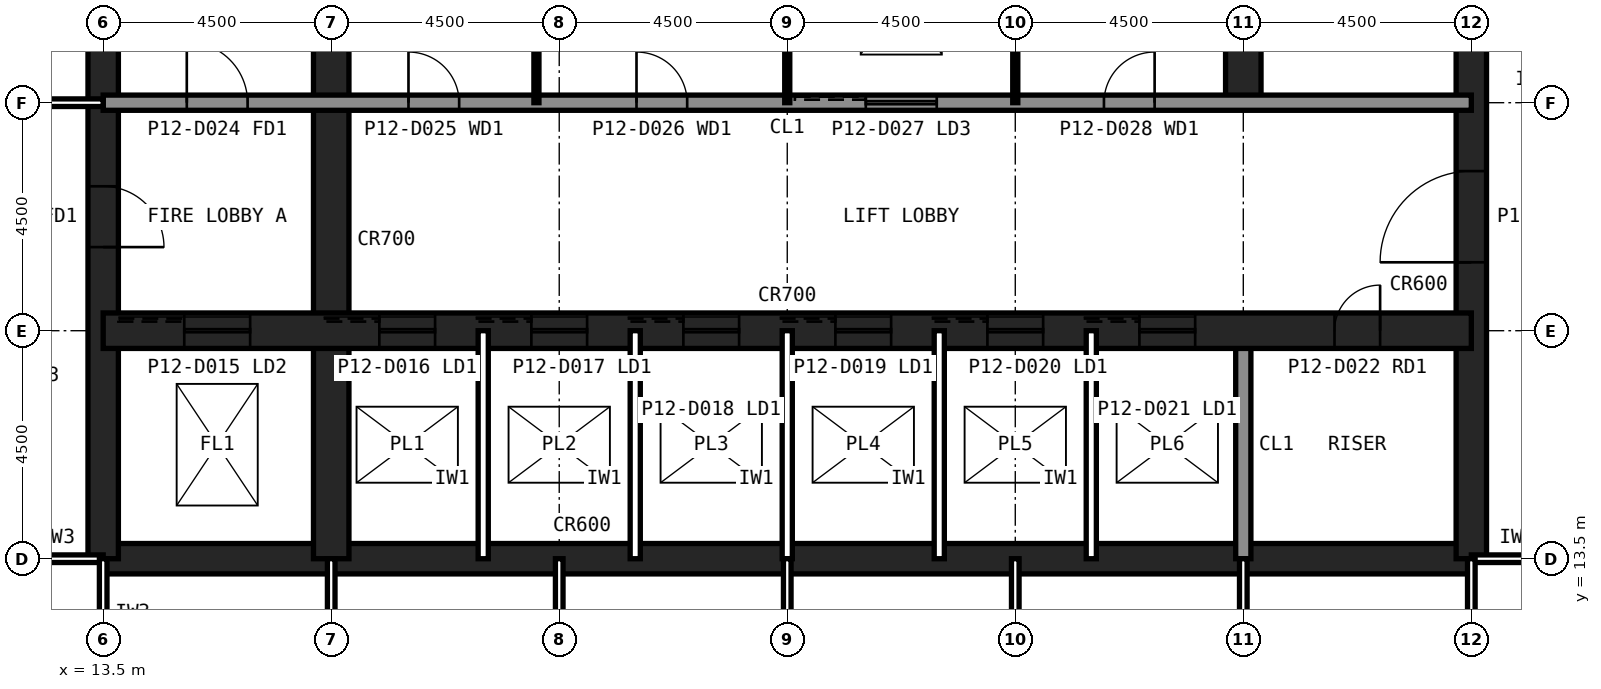
"""IFC4 building model, lengths in metres.
Left out: names, types, materials, properties, quantities, classifications, styles, units other than length and angle.
Written with IfcOpenShell. Run it as: python <this file> out.ifc"""

import sys

from ifc_helpers import new_model, si_unit, direction, frame, frame_2d, origin, place, context, subcontext, project, spatial, rectangle, extrude, element, fill, save


model = new_model("IFC4")
c1 = context("Model", 3, precision=1e-05, world=origin(), true_north=direction((0.0, 1.0)))
c2 = subcontext(c1, "Body", "Model", "MODEL_VIEW")
j1 = project(units=[si_unit("LENGTHUNIT", "METRE"), si_unit("PLANEANGLEUNIT", "RADIAN")], contexts=[c1])
p1 = place(None, origin())
s1 = spatial("IfcSite", under=j1, at=p1, CompositionType="ELEMENT")
p2 = place(p1, origin())
s2 = spatial("IfcBuilding", under=s1, at=p2, CompositionType="ELEMENT")
p3 = place(p2, frame((0.0, 0.0, 54.2)))
s3 = spatial("IfcBuildingStorey", under=s2, at=p3, CompositionType="ELEMENT", Elevation=54.2)
p4 = place(p3, frame((13.5, 13.5, 0.0), z_axis=(0.0, 0.0, 1.0), x_axis=(1.0, 0.0, 0.0)))
e1 = element("IfcWall", 1, at=p4, inside=s3, PredefinedType="SHEAR", context=c2, shape_type="SweptSolid", body=[
    extrude(rectangle(XDim=27.0, YDim=0.6, at=frame_2d((13.5, 0.0))), origin(), (0.0, 0.0, 1.0), 4.2),
])
p5 = place(p3, frame((40.5, 13.5, 0.0), z_axis=(0.0, 0.0, 1.0), x_axis=(0.0, 1.0, 0.0)))
e2 = element("IfcWall", 2, at=p5, inside=s3, PredefinedType="SHEAR", context=c2, shape_type="SweptSolid", body=[
    extrude(rectangle(XDim=27.0, YDim=0.6, at=frame_2d((13.5, 0.0))), origin(), (0.0, 0.0, 1.0), 4.2),
])
p6 = place(p5, frame((5.85, 0.0, 0.0)))
e3 = element("IfcOpeningElement", 3, at=p6, cuts=e2, PredefinedType="OPENING", context=c2, shape_type="SweptSolid", body=[
    extrude(rectangle(XDim=1.8, YDim=2.1, at=frame_2d((0.9, 1.05))), frame((0.0, 0.31, 0.0), z_axis=(0.0, -1.0, 0.0), x_axis=(1.0, 0.0, 0.0)), (0.0, 0.0, 1.0), 0.62),
])
p7 = place(p5, frame((19.65, 0.0, 0.0)))
e4 = element("IfcOpeningElement", 4, at=p7, cuts=e2, PredefinedType="OPENING", context=c2, shape_type="SweptSolid", body=[
    extrude(rectangle(XDim=1.2, YDim=2.1, at=frame_2d((0.6, 1.05))), frame((0.0, 0.31, 0.0), z_axis=(0.0, -1.0, 0.0), x_axis=(1.0, 0.0, 0.0)), (0.0, 0.0, 1.0), 0.62),
])
p8 = place(p3, frame((13.5, 40.5, 0.0), z_axis=(0.0, 0.0, 1.0), x_axis=(0.0, -1.0, 0.0)))
e5 = element("IfcWall", 5, at=p8, inside=s3, PredefinedType="SHEAR", context=c2, shape_type="SweptSolid", body=[
    extrude(rectangle(XDim=27.0, YDim=0.6, at=frame_2d((13.5, 0.0))), origin(), (0.0, 0.0, 1.0), 4.2),
])
p9 = place(p8, frame((19.65, 0.0, 0.0)))
e6 = element("IfcOpeningElement", 6, at=p9, cuts=e5, PredefinedType="OPENING", context=c2, shape_type="SweptSolid", body=[
    extrude(rectangle(XDim=1.2, YDim=2.1, at=frame_2d((0.6, 1.05))), frame((0.0, 0.31, 0.0), z_axis=(0.0, -1.0, 0.0), x_axis=(1.0, 0.0, 0.0)), (0.0, 0.0, 1.0), 0.62),
])
p10 = place(p8, frame((5.85, 0.0, 0.0)))
e7 = element("IfcOpeningElement", 7, at=p10, cuts=e5, PredefinedType="OPENING", context=c2, shape_type="SweptSolid", body=[
    extrude(rectangle(XDim=1.8, YDim=2.1, at=frame_2d((0.9, 1.05))), frame((0.0, 0.31, 0.0), z_axis=(0.0, -1.0, 0.0), x_axis=(1.0, 0.0, 0.0)), (0.0, 0.0, 1.0), 0.62),
])
p11 = place(p3, frame((18.0, 13.5, 0.0), z_axis=(0.0, 0.0, 1.0), x_axis=(0.0, 1.0, 0.0)))
e8 = element("IfcWall", 8, at=p11, inside=s3, PredefinedType="SHEAR", context=c2, shape_type="SweptSolid", body=[
    extrude(rectangle(XDim=18.0, YDim=0.7, at=frame_2d((9.0, 0.0))), origin(), (0.0, 0.0, 1.0), 4.2),
])
p12 = place(p3, frame((36.0, 13.5, 0.0), z_axis=(0.0, 0.0, 1.0), x_axis=(0.0, 1.0, 0.0)))
e9 = element("IfcWall", 9, at=p12, inside=s3, PredefinedType="SOLIDWALL", context=c2, shape_type="SweptSolid", body=[
    extrude(rectangle(XDim=4.5, YDim=0.3, at=frame_2d((2.25, 0.0))), origin(), (0.0, 0.0, 1.0), 4.04),
])
p13 = place(p3, frame((36.0, 22.5, 0.0), z_axis=(0.0, 0.0, 1.0), x_axis=(0.0, 1.0, 0.0)))
e10 = element("IfcWall", 10, at=p13, inside=s3, PredefinedType="SHEAR", context=c2, shape_type="SweptSolid", body=[
    extrude(rectangle(XDim=18.0, YDim=0.7, at=frame_2d((9.0, 0.0))), origin(), (0.0, 0.0, 1.0), 4.2),
])
p14 = place(p3, frame((13.5, 18.0, 0.0), z_axis=(0.0, 0.0, 1.0), x_axis=(1.0, 0.0, 0.0)))
e11 = element("IfcWall", 11, at=p14, inside=s3, PredefinedType="SHEAR", context=c2, shape_type="SweptSolid", body=[
    extrude(rectangle(XDim=27.0, YDim=0.7, at=frame_2d((13.5, 0.0))), origin(), (0.0, 0.0, 1.0), 4.2),
])
p15 = place(p14, frame((24.3, 0.0, 0.0)))
e12 = element("IfcOpeningElement", 12, at=p15, cuts=e11, PredefinedType="OPENING", context=c2, shape_type="SweptSolid", body=[
    extrude(rectangle(XDim=0.9, YDim=2.1, at=frame_2d((0.45, 1.05))), frame((0.0, 0.36, 0.0), z_axis=(0.0, -1.0, 0.0), x_axis=(1.0, 0.0, 0.0)), (0.0, 0.0, 1.0), 0.72),
])
p16 = place(p14, frame((5.45, 0.0, 0.0)))
e13 = element("IfcOpeningElement", 13, at=p16, cuts=e11, PredefinedType="OPENING", context=c2, shape_type="SweptSolid", body=[
    extrude(rectangle(XDim=1.1, YDim=2.1, at=frame_2d((0.55, 1.05))), frame((0.0, 0.36, 0.0), z_axis=(0.0, -1.0, 0.0), x_axis=(1.0, 0.0, 0.0)), (0.0, 0.0, 1.0), 0.72),
])
p17 = place(p14, frame((8.45, 0.0, 0.0)))
e14 = element("IfcOpeningElement", 14, at=p17, cuts=e11, PredefinedType="OPENING", context=c2, shape_type="SweptSolid", body=[
    extrude(rectangle(XDim=1.1, YDim=2.1, at=frame_2d((0.55, 1.05))), frame((0.0, 0.36, 0.0), z_axis=(0.0, -1.0, 0.0), x_axis=(1.0, 0.0, 0.0)), (0.0, 0.0, 1.0), 0.72),
])
p18 = place(p14, frame((11.45, 0.0, 0.0)))
e15 = element("IfcOpeningElement", 15, at=p18, cuts=e11, PredefinedType="OPENING", context=c2, shape_type="SweptSolid", body=[
    extrude(rectangle(XDim=1.1, YDim=2.1, at=frame_2d((0.55, 1.05))), frame((0.0, 0.36, 0.0), z_axis=(0.0, -1.0, 0.0), x_axis=(1.0, 0.0, 0.0)), (0.0, 0.0, 1.0), 0.72),
])
p19 = place(p14, frame((14.45, 0.0, 0.0)))
e16 = element("IfcOpeningElement", 16, at=p19, cuts=e11, PredefinedType="OPENING", context=c2, shape_type="SweptSolid", body=[
    extrude(rectangle(XDim=1.1, YDim=2.1, at=frame_2d((0.55, 1.05))), frame((0.0, 0.36, 0.0), z_axis=(0.0, -1.0, 0.0), x_axis=(1.0, 0.0, 0.0)), (0.0, 0.0, 1.0), 0.72),
])
p20 = place(p14, frame((17.45, 0.0, 0.0)))
e17 = element("IfcOpeningElement", 17, at=p20, cuts=e11, PredefinedType="OPENING", context=c2, shape_type="SweptSolid", body=[
    extrude(rectangle(XDim=1.1, YDim=2.1, at=frame_2d((0.55, 1.05))), frame((0.0, 0.36, 0.0), z_axis=(0.0, -1.0, 0.0), x_axis=(1.0, 0.0, 0.0)), (0.0, 0.0, 1.0), 0.72),
])
p21 = place(p14, frame((20.45, 0.0, 0.0)))
e18 = element("IfcOpeningElement", 18, at=p21, cuts=e11, PredefinedType="OPENING", context=c2, shape_type="SweptSolid", body=[
    extrude(rectangle(XDim=1.1, YDim=2.1, at=frame_2d((0.55, 1.05))), frame((0.0, 0.36, 0.0), z_axis=(0.0, -1.0, 0.0), x_axis=(1.0, 0.0, 0.0)), (0.0, 0.0, 1.0), 0.72),
])
p22 = place(p14, frame((1.6, 0.0, 0.0)))
e19 = element("IfcOpeningElement", 19, at=p22, cuts=e11, PredefinedType="OPENING", context=c2, shape_type="SweptSolid", body=[
    extrude(rectangle(XDim=1.3, YDim=2.2, at=frame_2d((0.65, 1.1))), frame((0.0, 0.36, 0.0), z_axis=(0.0, -1.0, 0.0), x_axis=(1.0, 0.0, 0.0)), (0.0, 0.0, 1.0), 0.72),
])
p23 = place(p3, frame((13.5, 22.5, 0.0), z_axis=(0.0, 0.0, 1.0), x_axis=(1.0, 0.0, 0.0)))
e20 = element("IfcWall", 20, at=p23, inside=s3, PredefinedType="SOLIDWALL", context=c2, shape_type="SweptSolid", body=[
    extrude(rectangle(XDim=27.0, YDim=0.3, at=frame_2d((13.5, 0.0))), origin(), (0.0, 0.0, 1.0), 4.04),
])
p24 = place(p23, frame((1.65, 0.0, 0.0)))
e21 = element("IfcOpeningElement", 21, at=p24, cuts=e20, PredefinedType="OPENING", context=c2, shape_type="SweptSolid", body=[
    extrude(rectangle(XDim=1.2, YDim=2.1, at=frame_2d((0.6, 1.05))), frame((0.0, 0.16, 0.0), z_axis=(0.0, -1.0, 0.0), x_axis=(1.0, 0.0, 0.0)), (0.0, 0.0, 1.0), 0.32),
])
p25 = place(p23, frame((6.025, 0.0, 0.0)))
e22 = element("IfcOpeningElement", 22, at=p25, cuts=e20, PredefinedType="OPENING", context=c2, shape_type="SweptSolid", body=[
    extrude(rectangle(XDim=1.0, YDim=2.1, at=frame_2d((0.5, 1.05))), frame((0.0, 0.16, 0.0), z_axis=(0.0, -1.0, 0.0), x_axis=(1.0, 0.0, 0.0)), (0.0, 0.0, 1.0), 0.32),
])
p26 = place(p23, frame((10.525, 0.0, 0.0)))
e23 = element("IfcOpeningElement", 23, at=p26, cuts=e20, PredefinedType="OPENING", context=c2, shape_type="SweptSolid", body=[
    extrude(rectangle(XDim=1.0, YDim=2.1, at=frame_2d((0.5, 1.05))), frame((0.0, 0.16, 0.0), z_axis=(0.0, -1.0, 0.0), x_axis=(1.0, 0.0, 0.0)), (0.0, 0.0, 1.0), 0.32),
])
p27 = place(p23, frame((19.75, 0.0, 0.0)))
e24 = element("IfcOpeningElement", 24, at=p27, cuts=e20, PredefinedType="OPENING", context=c2, shape_type="SweptSolid", body=[
    extrude(rectangle(XDim=1.0, YDim=2.1, at=frame_2d((0.5, 1.05))), frame((0.0, 0.16, 0.0), z_axis=(0.0, -1.0, 0.0), x_axis=(1.0, 0.0, 0.0)), (0.0, 0.0, 1.0), 0.32),
])
p28 = place(p23, frame((15.05, 0.0, 0.0)))
e25 = element("IfcOpeningElement", 25, at=p28, cuts=e20, PredefinedType="OPENING", context=c2, shape_type="SweptSolid", body=[
    extrude(rectangle(XDim=1.4, YDim=2.4, at=frame_2d((0.7, 1.2))), frame((0.0, 0.16, 0.0), z_axis=(0.0, -1.0, 0.0), x_axis=(1.0, 0.0, 0.0)), (0.0, 0.0, 1.0), 0.32),
])
for number, where, z_axis, x_axis in (
    (26, (21.0, 13.5, 0.0), (0.0, 0.0, 1.0), (0.0, 1.0, 0.0)),
    (27, (24.0, 13.5, 0.0), (0.0, 0.0, 1.0), (0.0, 1.0, 0.0)),
    (28, (27.0, 13.5, 0.0), (0.0, 0.0, 1.0), (0.0, 1.0, 0.0)),
    (29, (30.0, 13.5, 0.0), (0.0, 0.0, 1.0), (0.0, 1.0, 0.0)),
    (30, (33.0, 13.5, 0.0), (0.0, 0.0, 1.0), (0.0, 1.0, 0.0)),
):
    element("IfcWall", number, at=place(p3, frame(where, z_axis=z_axis, x_axis=x_axis)), inside=s3, PredefinedType="PARTITIONING", context=c2, shape_type="SweptSolid", body=[
        extrude(rectangle(XDim=4.5, YDim=0.2, at=frame_2d((2.25, 0.0))), origin(), (0.0, 0.0, 1.0), 4.04),
    ])
for number, where, z_axis, x_axis in (
    (31, (22.05, 22.5, 0.0), (0.0, 0.0, 1.0), (0.0, 1.0, 0.0)),
    (32, (27.0, 22.5, 0.0), (0.0, 0.0, 1.0), (0.0, 1.0, 0.0)),
    (33, (31.5, 22.5, 0.0), (0.0, 0.0, 1.0), (0.0, 1.0, 0.0)),
):
    element("IfcWall", number, at=place(p3, frame(where, z_axis=z_axis, x_axis=x_axis)), inside=s3, PredefinedType="PLUMBINGWALL", context=c2, shape_type="SweptSolid", body=[
        extrude(rectangle(XDim=9.0, YDim=0.1, at=frame_2d((4.5, 0.0))), origin(), (0.0, 0.0, 1.0), 4.04),
    ])
for number, where, z_axis, x_axis in (
    (34, (11.7, 13.5, 0.0), (0.0, 0.0, 1.0), (1.0, 0.0, 0.0)),
    (35, (40.5, 13.5, 0.0), (0.0, 0.0, 1.0), (1.0, 0.0, 0.0)),
):
    element("IfcWall", number, at=place(p3, frame(where, z_axis=z_axis, x_axis=x_axis)), inside=s3, PredefinedType="PARTITIONING", context=c2, shape_type="SweptSolid", body=[
        extrude(rectangle(XDim=1.8, YDim=0.15, at=frame_2d((0.9, 0.0))), origin(), (0.0, 0.0, 1.0), 3.189),
    ])
p29 = place(p3, frame((18.0, 8.1, 0.0), z_axis=(0.0, 0.0, 1.0), x_axis=(0.0, 1.0, 0.0)))
e36 = element("IfcWall", 36, at=p29, inside=s3, PredefinedType="PARTITIONING", context=c2, shape_type="SweptSolid", body=[
    extrude(rectangle(XDim=5.4, YDim=0.15, at=frame_2d((2.7, 0.0))), origin(), (0.0, 0.0, 1.0), 3.189),
])
p30 = place(p3, frame((13.5, 13.5, 0.0), z_axis=(0.0, 0.0, 1.0), x_axis=(0.0, -1.0, 0.0)))
e37 = element("IfcWall", 37, at=p30, inside=s3, PredefinedType="PARTITIONING", context=c2, shape_type="SweptSolid", body=[
    extrude(rectangle(XDim=5.4, YDim=0.15, at=frame_2d((2.7, 0.0))), origin(), (0.0, 0.0, 1.0), 3.189),
])
p31 = place(p30, frame((2.2, 0.0, 0.0)))
e38 = element("IfcOpeningElement", 38, at=p31, cuts=e37, PredefinedType="OPENING", context=c2, shape_type="SweptSolid", body=[
    extrude(rectangle(XDim=1.0, YDim=2.1, at=frame_2d((0.5, 1.05))), frame((0.0, 0.085, 0.0), z_axis=(0.0, -1.0, 0.0), x_axis=(1.0, 0.0, 0.0)), (0.0, 0.0, 1.0), 0.17),
])
for number, where, z_axis, x_axis in (
    (39, (22.5, 8.1, 0.0), (0.0, 0.0, 1.0), (0.0, 1.0, 0.0)),
    (40, (27.0, 8.1, 0.0), (0.0, 0.0, 1.0), (0.0, 1.0, 0.0)),
    (41, (31.5, 8.1, 0.0), (0.0, 0.0, 1.0), (0.0, 1.0, 0.0)),
    (42, (36.0, 8.1, 0.0), (0.0, 0.0, 1.0), (0.0, 1.0, 0.0)),
):
    element("IfcWall", number, at=place(p3, frame(where, z_axis=z_axis, x_axis=x_axis)), inside=s3, PredefinedType="PARTITIONING", context=c2, shape_type="SweptSolid", body=[
        extrude(rectangle(XDim=5.4, YDim=0.15, at=frame_2d((2.7, 0.0))), origin(), (0.0, 0.0, 1.0), 3.189),
    ])
p32 = place(p3, frame((40.5, 8.1, 0.0), z_axis=(0.0, 0.0, 1.0), x_axis=(0.0, 1.0, 0.0)))
e43 = element("IfcWall", 43, at=p32, inside=s3, PredefinedType="PARTITIONING", context=c2, shape_type="SweptSolid", body=[
    extrude(rectangle(XDim=5.4, YDim=0.15, at=frame_2d((2.7, 0.0))), origin(), (0.0, 0.0, 1.0), 3.189),
])
p33 = place(p32, frame((2.2, 0.0, 0.0)))
e44 = element("IfcOpeningElement", 44, at=p33, cuts=e43, PredefinedType="OPENING", context=c2, shape_type="SweptSolid", body=[
    extrude(rectangle(XDim=1.0, YDim=2.1, at=frame_2d((0.5, 1.05))), frame((0.0, 0.085, 0.0), z_axis=(0.0, -1.0, 0.0), x_axis=(1.0, 0.0, 0.0)), (0.0, 0.0, 1.0), 0.17),
])
p34 = place(p3, frame((9.9, 22.5, 0.0), z_axis=(0.0, 0.0, 1.0), x_axis=(1.0, 0.0, 0.0)))
e45 = element("IfcWall", 45, at=p34, inside=s3, PredefinedType="PARTITIONING", context=c2, shape_type="SweptSolid", body=[
    extrude(rectangle(XDim=3.6, YDim=0.15, at=frame_2d((1.8, 0.0))), origin(), (0.0, 0.0, 1.0), 3.189),
])
p35 = place(p9, origin())
e46 = element("IfcDoor", 46, at=p35, inside=s3, OperationType="SINGLE_SWING_RIGHT", PredefinedType="DOOR", context=c2, shape_type="SweptSolid", body=[
    extrude(rectangle(XDim=1.2, YDim=2.1, at=frame_2d((0.6, 1.05))), frame((0.0, 0.025, 0.0), z_axis=(0.0, -1.0, 0.0), x_axis=(1.0, 0.0, 0.0)), (0.0, 0.0, 1.0), 0.05),
])
fill(e6, e46)
p36 = place(p6, origin())
e47 = element("IfcDoor", 47, at=p36, inside=s3, OperationType="SINGLE_SWING_LEFT", PredefinedType="DOOR", context=c2, shape_type="SweptSolid", body=[
    extrude(rectangle(XDim=1.8, YDim=2.1, at=frame_2d((0.9, 1.05))), frame((0.0, 0.025, 0.0), z_axis=(0.0, -1.0, 0.0), x_axis=(1.0, 0.0, 0.0)), (0.0, 0.0, 1.0), 0.05),
])
fill(e3, e47)
p37 = place(p24, origin())
e48 = element("IfcDoor", 48, at=p37, inside=s3, OperationType="SINGLE_SWING_LEFT", PredefinedType="DOOR", context=c2, shape_type="SweptSolid", body=[
    extrude(rectangle(XDim=1.2, YDim=2.1, at=frame_2d((0.6, 1.05))), frame((0.0, 0.025, 0.0), z_axis=(0.0, -1.0, 0.0), x_axis=(1.0, 0.0, 0.0)), (0.0, 0.0, 1.0), 0.05),
])
fill(e21, e48)
p38 = place(p25, origin())
e49 = element("IfcDoor", 49, at=p38, inside=s3, OperationType="SINGLE_SWING_LEFT", PredefinedType="DOOR", context=c2, shape_type="SweptSolid", body=[
    extrude(rectangle(XDim=1.0, YDim=2.1, at=frame_2d((0.5, 1.05))), frame((0.0, 0.025, 0.0), z_axis=(0.0, -1.0, 0.0), x_axis=(1.0, 0.0, 0.0)), (0.0, 0.0, 1.0), 0.05),
])
fill(e22, e49)
p39 = place(p26, origin())
e50 = element("IfcDoor", 50, at=p39, inside=s3, OperationType="SINGLE_SWING_LEFT", PredefinedType="DOOR", context=c2, shape_type="SweptSolid", body=[
    extrude(rectangle(XDim=1.0, YDim=2.1, at=frame_2d((0.5, 1.05))), frame((0.0, 0.025, 0.0), z_axis=(0.0, -1.0, 0.0), x_axis=(1.0, 0.0, 0.0)), (0.0, 0.0, 1.0), 0.05),
])
fill(e23, e50)
p40 = place(p27, origin())
e51 = element("IfcDoor", 51, at=p40, inside=s3, OperationType="SINGLE_SWING_RIGHT", PredefinedType="DOOR", context=c2, shape_type="SweptSolid", body=[
    extrude(rectangle(XDim=1.0, YDim=2.1, at=frame_2d((0.5, 1.05))), frame((0.0, 0.025, 0.0), z_axis=(0.0, -1.0, 0.0), x_axis=(1.0, 0.0, 0.0)), (0.0, 0.0, 1.0), 0.05),
])
fill(e24, e51)
p41 = place(p15, origin())
e52 = element("IfcDoor", 52, at=p41, inside=s3, OperationType="SINGLE_SWING_RIGHT", PredefinedType="DOOR", context=c2, shape_type="SweptSolid", body=[
    extrude(rectangle(XDim=0.9, YDim=2.1, at=frame_2d((0.45, 1.05))), frame((0.0, 0.025, 0.0), z_axis=(0.0, -1.0, 0.0), x_axis=(1.0, 0.0, 0.0)), (0.0, 0.0, 1.0), 0.05),
])
fill(e12, e52)
p42 = place(p16, origin())
e53 = element("IfcDoor", 53, at=p42, inside=s3, OperationType="SLIDING_TO_LEFT", PredefinedType="DOOR", context=c2, shape_type="SweptSolid", body=[
    extrude(rectangle(XDim=1.1, YDim=2.1, at=frame_2d((0.55, 1.05))), frame((0.0, 0.025, 0.0), z_axis=(0.0, -1.0, 0.0), x_axis=(1.0, 0.0, 0.0)), (0.0, 0.0, 1.0), 0.05),
])
fill(e13, e53)
p43 = place(p17, origin())
e54 = element("IfcDoor", 54, at=p43, inside=s3, OperationType="SLIDING_TO_LEFT", PredefinedType="DOOR", context=c2, shape_type="SweptSolid", body=[
    extrude(rectangle(XDim=1.1, YDim=2.1, at=frame_2d((0.55, 1.05))), frame((0.0, 0.025, 0.0), z_axis=(0.0, -1.0, 0.0), x_axis=(1.0, 0.0, 0.0)), (0.0, 0.0, 1.0), 0.05),
])
fill(e14, e54)
p44 = place(p18, origin())
e55 = element("IfcDoor", 55, at=p44, inside=s3, OperationType="SLIDING_TO_LEFT", PredefinedType="DOOR", context=c2, shape_type="SweptSolid", body=[
    extrude(rectangle(XDim=1.1, YDim=2.1, at=frame_2d((0.55, 1.05))), frame((0.0, 0.025, 0.0), z_axis=(0.0, -1.0, 0.0), x_axis=(1.0, 0.0, 0.0)), (0.0, 0.0, 1.0), 0.05),
])
fill(e15, e55)
p45 = place(p19, origin())
e56 = element("IfcDoor", 56, at=p45, inside=s3, OperationType="SLIDING_TO_LEFT", PredefinedType="DOOR", context=c2, shape_type="SweptSolid", body=[
    extrude(rectangle(XDim=1.1, YDim=2.1, at=frame_2d((0.55, 1.05))), frame((0.0, 0.025, 0.0), z_axis=(0.0, -1.0, 0.0), x_axis=(1.0, 0.0, 0.0)), (0.0, 0.0, 1.0), 0.05),
])
fill(e16, e56)
p46 = place(p20, origin())
e57 = element("IfcDoor", 57, at=p46, inside=s3, OperationType="SLIDING_TO_LEFT", PredefinedType="DOOR", context=c2, shape_type="SweptSolid", body=[
    extrude(rectangle(XDim=1.1, YDim=2.1, at=frame_2d((0.55, 1.05))), frame((0.0, 0.025, 0.0), z_axis=(0.0, -1.0, 0.0), x_axis=(1.0, 0.0, 0.0)), (0.0, 0.0, 1.0), 0.05),
])
fill(e17, e57)
p47 = place(p21, origin())
e58 = element("IfcDoor", 58, at=p47, inside=s3, OperationType="SLIDING_TO_LEFT", PredefinedType="DOOR", context=c2, shape_type="SweptSolid", body=[
    extrude(rectangle(XDim=1.1, YDim=2.1, at=frame_2d((0.55, 1.05))), frame((0.0, 0.025, 0.0), z_axis=(0.0, -1.0, 0.0), x_axis=(1.0, 0.0, 0.0)), (0.0, 0.0, 1.0), 0.05),
])
fill(e18, e58)
p48 = place(p22, origin())
e59 = element("IfcDoor", 59, at=p48, inside=s3, OperationType="SLIDING_TO_LEFT", PredefinedType="DOOR", context=c2, shape_type="SweptSolid", body=[
    extrude(rectangle(XDim=1.3, YDim=2.2, at=frame_2d((0.65, 1.1))), frame((0.0, 0.025, 0.0), z_axis=(0.0, -1.0, 0.0), x_axis=(1.0, 0.0, 0.0)), (0.0, 0.0, 1.0), 0.05),
])
fill(e19, e59)
p49 = place(p28, origin())
e60 = element("IfcDoor", 60, at=p49, inside=s3, OperationType="SLIDING_TO_LEFT", PredefinedType="DOOR", context=c2, shape_type="SweptSolid", body=[
    extrude(rectangle(XDim=1.4, YDim=2.4, at=frame_2d((0.7, 1.2))), frame((0.0, 0.025, 0.0), z_axis=(0.0, -1.0, 0.0), x_axis=(1.0, 0.0, 0.0)), (0.0, 0.0, 1.0), 0.05),
])
fill(e25, e60)
save(model, sys.argv[1])
